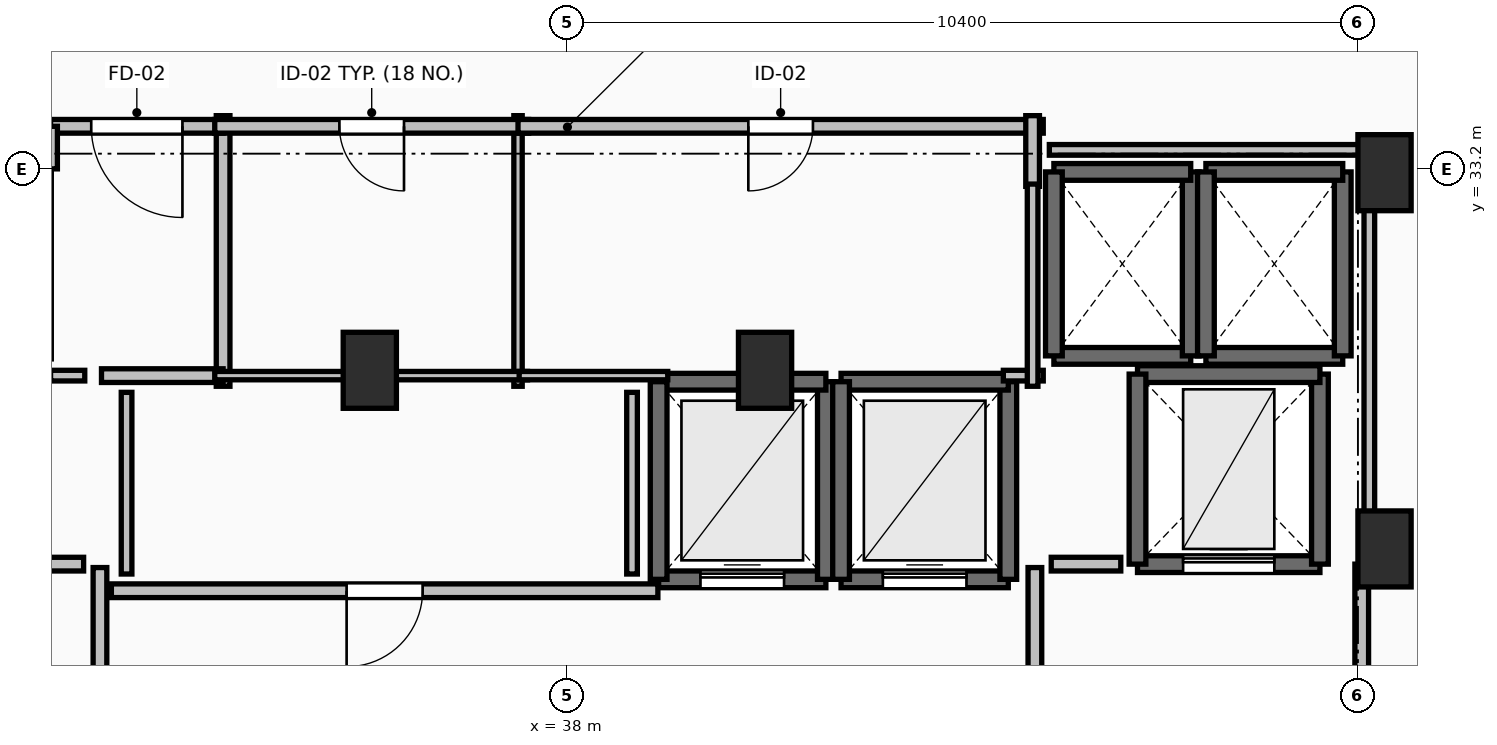
"""IFC4 building model, lengths in metres.
Left out: names, types, materials, properties, quantities, classifications, styles, units other than length and angle.
Written with IfcOpenShell. Run it as: python <this file> out.ifc"""

import sys

from ifc_helpers import new_model, si_unit, direction, frame, frame_2d, origin, origin_2d, place, context, subcontext, project, spatial, rectangle, extrude, element, fill, save


model = new_model("IFC4")
c1 = context("Model", 3, precision=1e-05, world=origin(), true_north=direction((0.0, 1.0)))
c2 = subcontext(c1, "Body", "Model", "MODEL_VIEW")
j1 = project(units=[si_unit("LENGTHUNIT", "METRE"), si_unit("PLANEANGLEUNIT", "RADIAN")], contexts=[c1])
p1 = place(None, origin())
s1 = spatial("IfcSite", under=j1, at=p1, CompositionType="ELEMENT")
p2 = place(p1, origin())
s2 = spatial("IfcBuilding", under=s1, at=p2, CompositionType="ELEMENT")
p3 = place(p2, frame((0.0, 0.0, 266.2)))
s3 = spatial("IfcBuildingStorey", under=s2, at=p3, CompositionType="ELEMENT", Elevation=266.2)
for number, where, z_axis, x_axis in (
    (1, (48.75, 33.15, 0.0), (0.0, 0.0, 1.0), (1.0, 0.0, 0.0)),
    (2, (48.75, 28.2, 0.0), (0.0, 0.0, 1.0), (1.0, 0.0, 0.0)),
    (3, (35.4, 30.55, 0.0), (0.0, 0.0, 1.0), (1.0, 0.0, 0.0)),
    (4, (40.6, 30.55, 0.0), (0.0, 0.0, 1.0), (1.0, 0.0, 0.0)),
):
    element("IfcColumn", number, at=place(p3, frame(where, z_axis=z_axis, x_axis=x_axis)), inside=s3, PredefinedType="PILASTER", context=c2, shape_type="SweptSolid", body=[
        extrude(rectangle(XDim=0.7, YDim=1.0, at=origin_2d()), origin(), (0.0, 0.0, 1.0), 3.55),
    ])
p4 = place(p3, frame((39.2, 27.8, 0.0), z_axis=(0.0, 0.0, 1.0), x_axis=(1.0, 0.0, 0.0)))
e5 = element("IfcWall", 5, at=p4, inside=s3, PredefinedType="SOLIDWALL", context=c2, shape_type="SweptSolid", body=[
    extrude(rectangle(XDim=2.2, YDim=0.22, at=frame_2d((1.1, 0.0))), origin(), (0.0, 0.0, 1.0), 3.29),
])
p5 = place(p4, frame((0.55, 0.0, 0.0)))
e6 = element("IfcOpeningElement", 6, at=p5, cuts=e5, PredefinedType="OPENING", context=c2, shape_type="SweptSolid", body=[
    extrude(rectangle(XDim=1.1, YDim=2.2, at=frame_2d((0.55, 1.1))), frame((0.0, 0.125, 0.0), z_axis=(0.0, -1.0, 0.0), x_axis=(1.0, 0.0, 0.0)), (0.0, 0.0, 1.0), 0.25),
])
p6 = place(p3, frame((41.4, 27.8, 0.0), z_axis=(0.0, 0.0, 1.0), x_axis=(0.0, 1.0, 0.0)))
e7 = element("IfcWall", 7, at=p6, inside=s3, PredefinedType="SOLIDWALL", context=c2, shape_type="SweptSolid", body=[
    extrude(rectangle(XDim=2.6, YDim=0.22, at=frame_2d((1.3, 0.0))), origin(), (0.0, 0.0, 1.0), 3.29),
])
p7 = place(p3, frame((41.4, 30.4, 0.0), z_axis=(0.0, 0.0, 1.0), x_axis=(-1.0, 0.0, 0.0)))
e8 = element("IfcWall", 8, at=p7, inside=s3, PredefinedType="SOLIDWALL", context=c2, shape_type="SweptSolid", body=[
    extrude(rectangle(XDim=2.2, YDim=0.22, at=frame_2d((1.1, 0.0))), origin(), (0.0, 0.0, 1.0), 3.29),
])
p8 = place(p3, frame((39.2, 30.4, 0.0), z_axis=(0.0, 0.0, 1.0), x_axis=(0.0, -1.0, 0.0)))
e9 = element("IfcWall", 9, at=p8, inside=s3, PredefinedType="SOLIDWALL", context=c2, shape_type="SweptSolid", body=[
    extrude(rectangle(XDim=2.6, YDim=0.22, at=frame_2d((1.3, 0.0))), origin(), (0.0, 0.0, 1.0), 3.29),
])
p9 = place(p3, frame((41.6, 27.8, 0.0), z_axis=(0.0, 0.0, 1.0), x_axis=(1.0, 0.0, 0.0)))
e10 = element("IfcWall", 10, at=p9, inside=s3, PredefinedType="SOLIDWALL", context=c2, shape_type="SweptSolid", body=[
    extrude(rectangle(XDim=2.2, YDim=0.22, at=frame_2d((1.1, 0.0))), origin(), (0.0, 0.0, 1.0), 3.29),
])
p10 = place(p9, frame((0.55, 0.0, 0.0)))
e11 = element("IfcOpeningElement", 11, at=p10, cuts=e10, PredefinedType="OPENING", context=c2, shape_type="SweptSolid", body=[
    extrude(rectangle(XDim=1.1, YDim=2.2, at=frame_2d((0.55, 1.1))), frame((0.0, 0.125, 0.0), z_axis=(0.0, -1.0, 0.0), x_axis=(1.0, 0.0, 0.0)), (0.0, 0.0, 1.0), 0.25),
])
p11 = place(p3, frame((43.8, 27.8, 0.0), z_axis=(0.0, 0.0, 1.0), x_axis=(0.0, 1.0, 0.0)))
e12 = element("IfcWall", 12, at=p11, inside=s3, PredefinedType="SOLIDWALL", context=c2, shape_type="SweptSolid", body=[
    extrude(rectangle(XDim=2.6, YDim=0.22, at=frame_2d((1.3, 0.0))), origin(), (0.0, 0.0, 1.0), 3.29),
])
p12 = place(p3, frame((43.8, 30.4, 0.0), z_axis=(0.0, 0.0, 1.0), x_axis=(-1.0, 0.0, 0.0)))
e13 = element("IfcWall", 13, at=p12, inside=s3, PredefinedType="SOLIDWALL", context=c2, shape_type="SweptSolid", body=[
    extrude(rectangle(XDim=2.2, YDim=0.22, at=frame_2d((1.1, 0.0))), origin(), (0.0, 0.0, 1.0), 3.29),
])
p13 = place(p3, frame((41.6, 30.4, 0.0), z_axis=(0.0, 0.0, 1.0), x_axis=(0.0, -1.0, 0.0)))
e14 = element("IfcWall", 14, at=p13, inside=s3, PredefinedType="SOLIDWALL", context=c2, shape_type="SweptSolid", body=[
    extrude(rectangle(XDim=2.6, YDim=0.22, at=frame_2d((1.3, 0.0))), origin(), (0.0, 0.0, 1.0), 3.29),
])
p14 = place(p3, frame((44.4, 30.74, 0.0), z_axis=(0.0, 0.0, 1.0), x_axis=(1.0, 0.0, 0.0)))
e15 = element("IfcWall", 15, at=p14, inside=s3, PredefinedType="SOLIDWALL", context=c2, shape_type="SweptSolid", body=[
    extrude(rectangle(XDim=1.8, YDim=0.22, at=frame_2d((0.9, 0.0))), origin(), (0.0, 0.0, 1.0), 3.29),
])
p15 = place(p3, frame((46.2, 30.74, 0.0), z_axis=(0.0, 0.0, 1.0), x_axis=(0.0, 1.0, 0.0)))
e16 = element("IfcWall", 16, at=p15, inside=s3, PredefinedType="SOLIDWALL", context=c2, shape_type="SweptSolid", body=[
    extrude(rectangle(XDim=2.42, YDim=0.22, at=frame_2d((1.21, 0.0))), origin(), (0.0, 0.0, 1.0), 3.29),
])
p16 = place(p3, frame((46.2, 33.16, 0.0), z_axis=(0.0, 0.0, 1.0), x_axis=(-1.0, 0.0, 0.0)))
e17 = element("IfcWall", 17, at=p16, inside=s3, PredefinedType="SOLIDWALL", context=c2, shape_type="SweptSolid", body=[
    extrude(rectangle(XDim=1.8, YDim=0.22, at=frame_2d((0.9, 0.0))), origin(), (0.0, 0.0, 1.0), 3.29),
])
p17 = place(p3, frame((44.4, 33.16, 0.0), z_axis=(0.0, 0.0, 1.0), x_axis=(0.0, -1.0, 0.0)))
e18 = element("IfcWall", 18, at=p17, inside=s3, PredefinedType="SOLIDWALL", context=c2, shape_type="SweptSolid", body=[
    extrude(rectangle(XDim=2.42, YDim=0.22, at=frame_2d((1.21, 0.0))), origin(), (0.0, 0.0, 1.0), 3.29),
])
p18 = place(p3, frame((46.4, 30.74, 0.0), z_axis=(0.0, 0.0, 1.0), x_axis=(1.0, 0.0, 0.0)))
e19 = element("IfcWall", 19, at=p18, inside=s3, PredefinedType="SOLIDWALL", context=c2, shape_type="SweptSolid", body=[
    extrude(rectangle(XDim=1.8, YDim=0.22, at=frame_2d((0.9, 0.0))), origin(), (0.0, 0.0, 1.0), 3.29),
])
p19 = place(p3, frame((48.2, 30.74, 0.0), z_axis=(0.0, 0.0, 1.0), x_axis=(0.0, 1.0, 0.0)))
e20 = element("IfcWall", 20, at=p19, inside=s3, PredefinedType="SOLIDWALL", context=c2, shape_type="SweptSolid", body=[
    extrude(rectangle(XDim=2.42, YDim=0.22, at=frame_2d((1.21, 0.0))), origin(), (0.0, 0.0, 1.0), 3.29),
])
p20 = place(p3, frame((48.2, 33.16, 0.0), z_axis=(0.0, 0.0, 1.0), x_axis=(-1.0, 0.0, 0.0)))
e21 = element("IfcWall", 21, at=p20, inside=s3, PredefinedType="SOLIDWALL", context=c2, shape_type="SweptSolid", body=[
    extrude(rectangle(XDim=1.8, YDim=0.22, at=frame_2d((0.9, 0.0))), origin(), (0.0, 0.0, 1.0), 3.29),
])
p21 = place(p3, frame((46.4, 33.16, 0.0), z_axis=(0.0, 0.0, 1.0), x_axis=(0.0, -1.0, 0.0)))
e22 = element("IfcWall", 22, at=p21, inside=s3, PredefinedType="SOLIDWALL", context=c2, shape_type="SweptSolid", body=[
    extrude(rectangle(XDim=2.42, YDim=0.22, at=frame_2d((1.21, 0.0))), origin(), (0.0, 0.0, 1.0), 3.29),
])
p22 = place(p3, frame((45.5, 28.0, 0.0), z_axis=(0.0, 0.0, 1.0), x_axis=(1.0, 0.0, 0.0)))
e23 = element("IfcWall", 23, at=p22, inside=s3, PredefinedType="SHEAR", context=c2, shape_type="SweptSolid", body=[
    extrude(rectangle(XDim=2.4, YDim=0.22, at=frame_2d((1.2, 0.0))), origin(), (0.0, 0.0, 1.0), 3.29),
])
p23 = place(p22, frame((0.6, 0.0, 0.0)))
e24 = element("IfcOpeningElement", 24, at=p23, cuts=e23, PredefinedType="OPENING", context=c2, shape_type="SweptSolid", body=[
    extrude(rectangle(XDim=1.2, YDim=2.2, at=frame_2d((0.6, 1.1))), frame((0.0, 0.125, 0.0), z_axis=(0.0, -1.0, 0.0), x_axis=(1.0, 0.0, 0.0)), (0.0, 0.0, 1.0), 0.25),
])
p24 = place(p3, frame((47.9, 28.0, 0.0), z_axis=(0.0, 0.0, 1.0), x_axis=(0.0, 1.0, 0.0)))
e25 = element("IfcWall", 25, at=p24, inside=s3, PredefinedType="SHEAR", context=c2, shape_type="SweptSolid", body=[
    extrude(rectangle(XDim=2.5, YDim=0.22, at=frame_2d((1.25, 0.0))), origin(), (0.0, 0.0, 1.0), 3.29),
])
p25 = place(p3, frame((47.9, 30.5, 0.0), z_axis=(0.0, 0.0, 1.0), x_axis=(-1.0, 0.0, 0.0)))
e26 = element("IfcWall", 26, at=p25, inside=s3, PredefinedType="SHEAR", context=c2, shape_type="SweptSolid", body=[
    extrude(rectangle(XDim=2.4, YDim=0.22, at=frame_2d((1.2, 0.0))), origin(), (0.0, 0.0, 1.0), 3.29),
])
p26 = place(p3, frame((45.5, 30.5, 0.0), z_axis=(0.0, 0.0, 1.0), x_axis=(0.0, -1.0, 0.0)))
e27 = element("IfcWall", 27, at=p26, inside=s3, PredefinedType="SHEAR", context=c2, shape_type="SweptSolid", body=[
    extrude(rectangle(XDim=2.5, YDim=0.22, at=frame_2d((1.25, 0.0))), origin(), (0.0, 0.0, 1.0), 3.29),
])
p27 = place(p3, frame((31.85, 24.045, 0.0), z_axis=(0.0, 0.0, 1.0), x_axis=(0.0, 1.0, 0.0)))
e28 = element("IfcWall", 28, at=p27, inside=s3, PredefinedType="PARTITIONING", context=c2, shape_type="SweptSolid", body=[
    extrude(rectangle(XDim=3.91, YDim=0.18, at=frame_2d((1.955, 0.0))), origin(), (0.0, 0.0, 1.0), 3.29),
])
p28 = place(p27, frame((1.355, 0.0, 0.0)))
e29 = element("IfcOpeningElement", 29, at=p28, cuts=e28, PredefinedType="OPENING", context=c2, shape_type="SweptSolid", body=[
    extrude(rectangle(XDim=1.2, YDim=2.15, at=frame_2d((0.6, 1.075))), frame((0.0, 0.105, 0.0), z_axis=(0.0, -1.0, 0.0), x_axis=(1.0, 0.0, 0.0)), (0.0, 0.0, 1.0), 0.21),
])
p29 = place(p3, frame((44.15, 27.955, 0.0), z_axis=(0.0, 0.0, 1.0), x_axis=(0.0, -1.0, 0.0)))
e30 = element("IfcWall", 30, at=p29, inside=s3, PredefinedType="PARTITIONING", context=c2, shape_type="SweptSolid", body=[
    extrude(rectangle(XDim=3.91, YDim=0.18, at=frame_2d((1.955, 0.0))), origin(), (0.0, 0.0, 1.0), 3.29),
])
p30 = place(p29, frame((1.355, 0.0, 0.0)))
e31 = element("IfcOpeningElement", 31, at=p30, cuts=e30, PredefinedType="OPENING", context=c2, shape_type="SweptSolid", body=[
    extrude(rectangle(XDim=1.2, YDim=2.15, at=frame_2d((0.6, 1.075))), frame((0.0, 0.105, 0.0), z_axis=(0.0, -1.0, 0.0), x_axis=(1.0, 0.0, 0.0)), (0.0, 0.0, 1.0), 0.21),
])
p31 = place(p3, frame((48.45, 23.95, 0.0), z_axis=(0.0, 0.0, 1.0), x_axis=(0.0, 1.0, 0.0)))
e32 = element("IfcWall", 32, at=p31, inside=s3, PredefinedType="PARTITIONING", context=c2, shape_type="SweptSolid", body=[
    extrude(rectangle(XDim=4.05, YDim=0.18, at=frame_2d((2.025, 0.0))), origin(), (0.0, 0.0, 1.0), 3.29),
])
p32 = place(p31, frame((1.425, 0.0, 0.0)))
e33 = element("IfcOpeningElement", 33, at=p32, cuts=e32, PredefinedType="OPENING", context=c2, shape_type="SweptSolid", body=[
    extrude(rectangle(XDim=1.2, YDim=2.15, at=frame_2d((0.6, 1.075))), frame((0.0, 0.105, 0.0), z_axis=(0.0, -1.0, 0.0), x_axis=(1.0, 0.0, 0.0)), (0.0, 0.0, 1.0), 0.21),
])
p33 = place(p3, frame((33.47, 30.34, 0.0), z_axis=(0.0, 0.0, 1.0), x_axis=(0.0, 1.0, 0.0)))
e34 = element("IfcWall", 34, at=p33, inside=s3, PredefinedType="PARTITIONING", context=c2, shape_type="SweptSolid", body=[
    extrude(rectangle(XDim=3.56, YDim=0.18, at=frame_2d((1.78, 0.0))), origin(), (0.0, 0.0, 1.0), 3.29),
])
p34 = place(p3, frame((31.87, 30.48, 0.0), z_axis=(0.0, 0.0, 1.0), x_axis=(1.0, 0.0, 0.0)))
e35 = element("IfcWall", 35, at=p34, inside=s3, PredefinedType="PARTITIONING", context=c2, shape_type="SweptSolid", body=[
    extrude(rectangle(XDim=1.6, YDim=0.18, at=frame_2d((0.8, 0.0))), origin(), (0.0, 0.0, 1.0), 3.29),
])
p35 = place(p3, frame((33.47, 33.76, 0.0), z_axis=(0.0, 0.0, 1.0), x_axis=(-1.0, 0.0, 0.0)))
e36 = element("IfcWall", 36, at=p35, inside=s3, PredefinedType="PARTITIONING", context=c2, shape_type="SweptSolid", body=[
    extrude(rectangle(XDim=2.27, YDim=0.18, at=frame_2d((1.135, 0.0))), origin(), (0.0, 0.0, 1.0), 3.29),
])
p36 = place(p35, frame((0.535, 0.0, 0.0)))
e37 = element("IfcOpeningElement", 37, at=p36, cuts=e36, PredefinedType="OPENING", context=c2, shape_type="SweptSolid", body=[
    extrude(rectangle(XDim=1.2, YDim=2.15, at=frame_2d((0.6, 1.075))), frame((0.0, 0.105, 0.0), z_axis=(0.0, -1.0, 0.0), x_axis=(1.0, 0.0, 0.0)), (0.0, 0.0, 1.0), 0.21),
])
p37 = place(p3, frame((31.2, 33.76, 0.0), z_axis=(0.0, 0.0, 1.0), x_axis=(0.0, -1.0, 0.0)))
e38 = element("IfcWall", 38, at=p37, inside=s3, PredefinedType="PARTITIONING", context=c2, shape_type="SweptSolid", body=[
    extrude(rectangle(XDim=0.56, YDim=0.18, at=frame_2d((0.28, 0.0))), origin(), (0.0, 0.0, 1.0), 3.29),
])
p38 = place(p3, frame((39.19, 27.65, 0.0), z_axis=(0.0, 0.0, 1.0), x_axis=(-1.0, 0.0, 0.0)))
e39 = element("IfcWall", 39, at=p38, inside=s3, PredefinedType="PARTITIONING", context=c2, shape_type="SweptSolid", body=[
    extrude(rectangle(XDim=7.19, YDim=0.18, at=frame_2d((3.595, 0.0))), origin(), (0.0, 0.0, 1.0), 3.29),
])
p39 = place(p38, frame((3.095, 0.0, 0.0)))
e40 = element("IfcOpeningElement", 40, at=p39, cuts=e39, PredefinedType="OPENING", context=c2, shape_type="SweptSolid", body=[
    extrude(rectangle(XDim=1.0, YDim=2.15, at=frame_2d((0.5, 1.075))), frame((0.0, 0.105, 0.0), z_axis=(0.0, -1.0, 0.0), x_axis=(1.0, 0.0, 0.0)), (0.0, 0.0, 1.0), 0.21),
])
p40 = place(p3, frame((37.35, 30.34, 0.0), z_axis=(0.0, 0.0, 1.0), x_axis=(0.0, 1.0, 0.0)))
e41 = element("IfcWall", 41, at=p40, inside=s3, PredefinedType="PARTITIONING", context=c2, shape_type="SweptSolid", body=[
    extrude(rectangle(XDim=3.56, YDim=0.11, at=frame_2d((1.78, 0.0))), origin(), (0.0, 0.0, 1.0), 2.482),
])
p41 = place(p3, frame((33.36, 30.48, 0.0), z_axis=(0.0, 0.0, 1.0), x_axis=(1.0, 0.0, 0.0)))
e42 = element("IfcWall", 42, at=p41, inside=s3, PredefinedType="PARTITIONING", context=c2, shape_type="SweptSolid", body=[
    extrude(rectangle(XDim=4.115, YDim=0.11, at=frame_2d((2.058, 0.0))), origin(), (0.0, 0.0, 1.0), 2.482),
])
p42 = place(p3, frame((37.49, 33.76, 0.0), z_axis=(0.0, 0.0, 1.0), x_axis=(-1.0, 0.0, 0.0)))
e43 = element("IfcWall", 43, at=p42, inside=s3, PredefinedType="PARTITIONING", context=c2, shape_type="SweptSolid", body=[
    extrude(rectangle(XDim=4.13, YDim=0.18, at=frame_2d((2.065, 0.0))), origin(), (0.0, 0.0, 1.0), 3.29),
])
p43 = place(p42, frame((1.64, 0.0, 0.0)))
e44 = element("IfcOpeningElement", 44, at=p43, cuts=e43, PredefinedType="OPENING", context=c2, shape_type="SweptSolid", body=[
    extrude(rectangle(XDim=0.85, YDim=2.1, at=frame_2d((0.425, 1.05))), frame((0.0, 0.105, 0.0), z_axis=(0.0, -1.0, 0.0), x_axis=(1.0, 0.0, 0.0)), (0.0, 0.0, 1.0), 0.21),
])
p44 = place(p3, frame((37.365, 30.48, 0.0), z_axis=(0.0, 0.0, 1.0), x_axis=(1.0, 0.0, 0.0)))
e45 = element("IfcWall", 45, at=p44, inside=s3, PredefinedType="PARTITIONING", context=c2, shape_type="SweptSolid", body=[
    extrude(rectangle(XDim=1.955, YDim=0.11, at=frame_2d((0.978, 0.0))), origin(), (0.0, 0.0, 1.0), 2.482),
])
p45 = place(p3, frame((44.26, 33.76, 0.0), z_axis=(0.0, 0.0, 1.0), x_axis=(-1.0, 0.0, 0.0)))
e46 = element("IfcWall", 46, at=p45, inside=s3, PredefinedType="PARTITIONING", context=c2, shape_type="SweptSolid", body=[
    extrude(rectangle(XDim=6.91, YDim=0.18, at=frame_2d((3.455, 0.0))), origin(), (0.0, 0.0, 1.0), 3.29),
])
p46 = place(p45, frame((3.03, 0.0, 0.0)))
e47 = element("IfcOpeningElement", 47, at=p46, cuts=e46, PredefinedType="OPENING", context=c2, shape_type="SweptSolid", body=[
    extrude(rectangle(XDim=0.85, YDim=2.1, at=frame_2d((0.425, 1.05))), frame((0.0, 0.105, 0.0), z_axis=(0.0, -1.0, 0.0), x_axis=(1.0, 0.0, 0.0)), (0.0, 0.0, 1.0), 0.21),
])
p47 = place(p3, frame((44.12, 32.97, 0.0), z_axis=(0.0, 0.0, 1.0), x_axis=(0.0, 1.0, 0.0)))
e48 = element("IfcWall", 48, at=p47, inside=s3, PredefinedType="PARTITIONING", context=c2, shape_type="SweptSolid", body=[
    extrude(rectangle(XDim=0.93, YDim=0.18, at=frame_2d((0.465, 0.0))), origin(), (0.0, 0.0, 1.0), 3.29),
])
for number, where, z_axis, x_axis in (
    (49, (31.635, 28.0, 0.0), (0.0, 0.0, 1.0), (-1.0, 0.0, 0.0)),
    (50, (45.28, 28.0, 0.0), (0.0, 0.0, 1.0), (-1.0, 0.0, 0.0)),
):
    element("IfcWall", number, at=place(p3, frame(where, z_axis=z_axis, x_axis=x_axis)), inside=s3, PredefinedType="PARTITIONING", context=c2, shape_type="SweptSolid", body=[
        extrude(rectangle(XDim=0.915, YDim=0.18, at=frame_2d((0.458, 0.0))), origin(), (0.0, 0.0, 1.0), 3.29),
    ])
p48 = place(p3, frame((31.2, 30.48, 0.0), z_axis=(0.0, 0.0, 1.0), x_axis=(1.0, 0.0, 0.0)))
e51 = element("IfcWall", 51, at=p48, inside=s3, PredefinedType="PARTITIONING", context=c2, shape_type="SweptSolid", body=[
    extrude(rectangle(XDim=0.45, YDim=0.14, at=frame_2d((0.225, 0.0))), origin(), (0.0, 0.0, 1.0), 3.29),
])
p49 = place(p3, frame((43.735, 30.48, 0.0), z_axis=(0.0, 0.0, 1.0), x_axis=(1.0, 0.0, 0.0)))
e52 = element("IfcWall", 52, at=p49, inside=s3, PredefinedType="PARTITIONING", context=c2, shape_type="SweptSolid", body=[
    extrude(rectangle(XDim=0.525, YDim=0.14, at=frame_2d((0.262, 0.0))), origin(), (0.0, 0.0, 1.0), 3.29),
])
p50 = place(p3, frame((44.12, 30.34, 0.0), z_axis=(0.0, 0.0, 1.0), x_axis=(0.0, 1.0, 0.0)))
e53 = element("IfcWall", 53, at=p50, inside=s3, PredefinedType="PARTITIONING", context=c2, shape_type="SweptSolid", body=[
    extrude(rectangle(XDim=2.66, YDim=0.14, at=frame_2d((1.33, 0.0))), origin(), (0.0, 0.0, 1.0), 3.29),
])
for number, where, z_axis, x_axis in (
    (54, (32.2, 30.26, 0.0), (0.0, 0.0, 1.0), (0.0, -1.0, 0.0)),
    (55, (38.85, 27.87, 0.0), (0.0, 0.0, 1.0), (0.0, 1.0, 0.0)),
):
    element("IfcWall", number, at=place(p3, frame(where, z_axis=z_axis, x_axis=x_axis)), inside=s3, PredefinedType="PARTITIONING", context=c2, shape_type="SweptSolid", body=[
        extrude(rectangle(XDim=2.39, YDim=0.14, at=frame_2d((1.195, 0.0))), origin(), (0.0, 0.0, 1.0), 3.29),
    ])
p51 = place(p3, frame((48.55, 28.196, 0.0), z_axis=(0.0, 0.0, 1.0), x_axis=(0.0, 1.0, 0.0)))
e56 = element("IfcWall", 56, at=p51, inside=s3, PredefinedType="PARTITIONING", context=c2, shape_type="SweptSolid", body=[
    extrude(rectangle(XDim=5.254, YDim=0.14, at=frame_2d((2.627, 0.0))), origin(), (0.0, 0.0, 1.0), 2.482),
])
p52 = place(p3, frame((48.55, 33.45, 0.0), z_axis=(0.0, 0.0, 1.0), x_axis=(-1.0, 0.0, 0.0)))
e57 = element("IfcWall", 57, at=p52, inside=s3, PredefinedType="PARTITIONING", context=c2, shape_type="SweptSolid", body=[
    extrude(rectangle(XDim=4.21, YDim=0.14, at=frame_2d((2.105, 0.0))), origin(), (0.0, 0.0, 1.0), 2.482),
])
p53 = place(p5, origin())
e58 = element("IfcDoor", 58, at=p53, inside=s3, OperationType="SLIDING_TO_LEFT", PredefinedType="DOOR", context=c2, shape_type="SweptSolid", body=[
    extrude(rectangle(XDim=1.1, YDim=2.2, at=frame_2d((0.55, 1.1))), frame((0.0, 0.025, 0.0), z_axis=(0.0, -1.0, 0.0), x_axis=(1.0, 0.0, 0.0)), (0.0, 0.0, 1.0), 0.05),
])
fill(e6, e58)
p54 = place(p10, origin())
e59 = element("IfcDoor", 59, at=p54, inside=s3, OperationType="SLIDING_TO_LEFT", PredefinedType="DOOR", context=c2, shape_type="SweptSolid", body=[
    extrude(rectangle(XDim=1.1, YDim=2.2, at=frame_2d((0.55, 1.1))), frame((0.0, 0.025, 0.0), z_axis=(0.0, -1.0, 0.0), x_axis=(1.0, 0.0, 0.0)), (0.0, 0.0, 1.0), 0.05),
])
fill(e11, e59)
p55 = place(p23, origin())
e60 = element("IfcDoor", 60, at=p55, inside=s3, OperationType="SLIDING_TO_LEFT", PredefinedType="DOOR", context=c2, shape_type="SweptSolid", body=[
    extrude(rectangle(XDim=1.2, YDim=2.2, at=frame_2d((0.6, 1.1))), frame((0.0, 0.025, 0.0), z_axis=(0.0, -1.0, 0.0), x_axis=(1.0, 0.0, 0.0)), (0.0, 0.0, 1.0), 0.05),
])
fill(e24, e60)
p56 = place(p36, origin())
e61 = element("IfcDoor", 61, at=p56, inside=s3, OperationType="SINGLE_SWING_LEFT", PredefinedType="DOOR", context=c2, shape_type="SweptSolid", body=[
    extrude(rectangle(XDim=1.2, YDim=2.15, at=frame_2d((0.6, 1.075))), frame((0.0, 0.025, 0.0), z_axis=(0.0, -1.0, 0.0), x_axis=(1.0, 0.0, 0.0)), (0.0, 0.0, 1.0), 0.05),
])
fill(e37, e61)
p57 = place(p39, origin())
e62 = element("IfcDoor", 62, at=p57, inside=s3, OperationType="SINGLE_SWING_RIGHT", PredefinedType="DOOR", context=c2, shape_type="SweptSolid", body=[
    extrude(rectangle(XDim=1.0, YDim=2.15, at=frame_2d((0.5, 1.075))), frame((0.0, 0.025, 0.0), z_axis=(0.0, -1.0, 0.0), x_axis=(1.0, 0.0, 0.0)), (0.0, 0.0, 1.0), 0.05),
])
fill(e40, e62)
p58 = place(p43, origin())
e63 = element("IfcDoor", 63, at=p58, inside=s3, OperationType="SINGLE_SWING_LEFT", PredefinedType="DOOR", context=c2, shape_type="SweptSolid", body=[
    extrude(rectangle(XDim=0.85, YDim=2.1, at=frame_2d((0.425, 1.05))), frame((0.0, 0.025, 0.0), z_axis=(0.0, -1.0, 0.0), x_axis=(1.0, 0.0, 0.0)), (0.0, 0.0, 1.0), 0.05),
])
fill(e44, e63)
p59 = place(p46, origin())
e64 = element("IfcDoor", 64, at=p59, inside=s3, OperationType="SINGLE_SWING_RIGHT", PredefinedType="DOOR", context=c2, shape_type="SweptSolid", body=[
    extrude(rectangle(XDim=0.85, YDim=2.1, at=frame_2d((0.425, 1.05))), frame((0.0, 0.025, 0.0), z_axis=(0.0, -1.0, 0.0), x_axis=(1.0, 0.0, 0.0)), (0.0, 0.0, 1.0), 0.05),
])
fill(e47, e64)
save(model, sys.argv[1])
